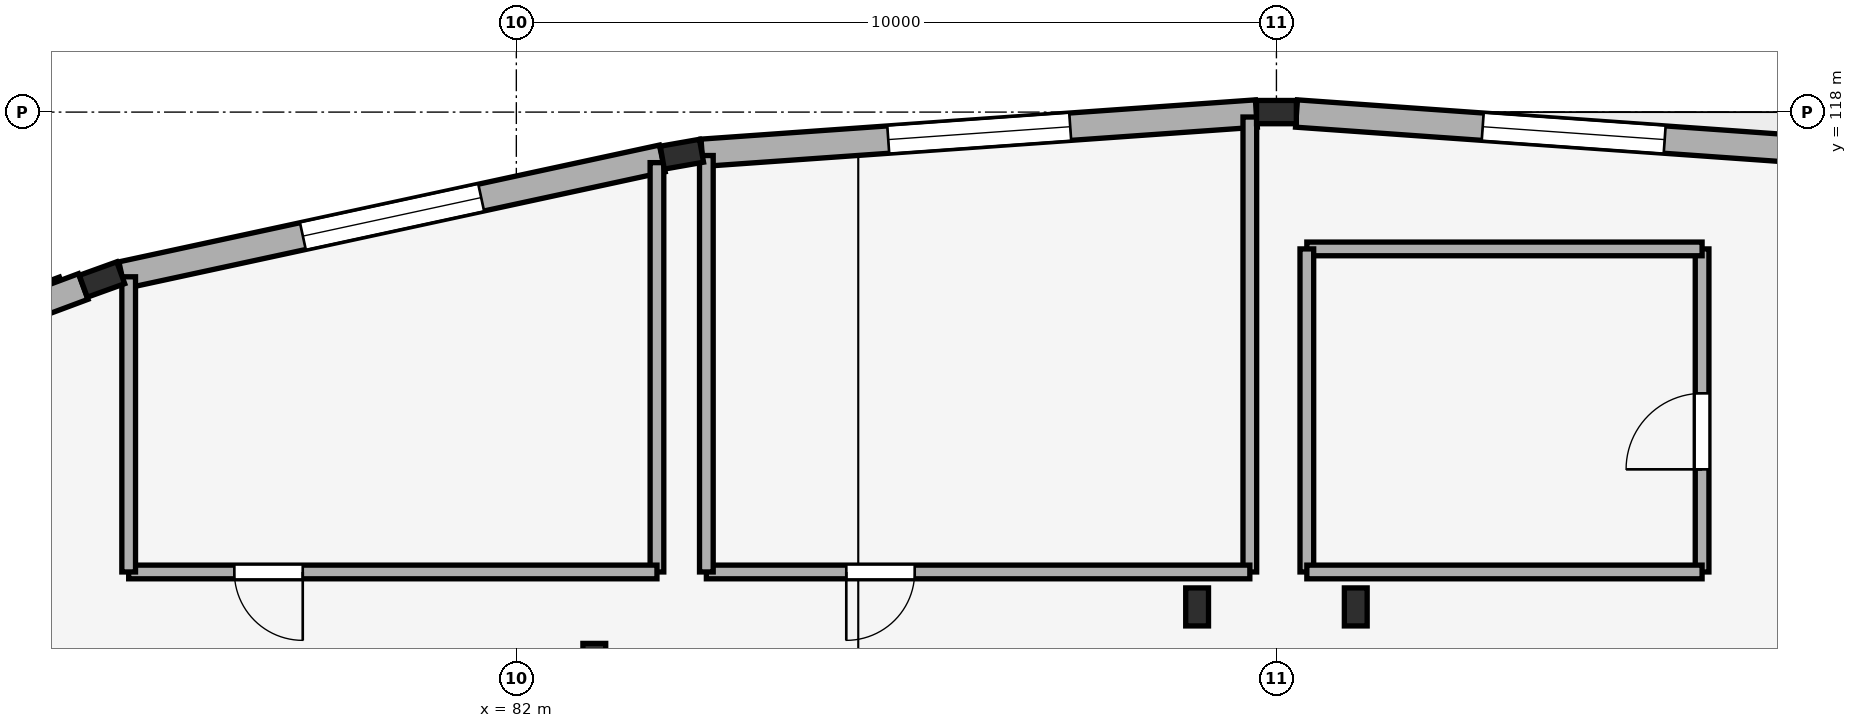
"""IFC4 building model, lengths in metres.
Left out: names, types, materials, properties, quantities, classifications, styles, units other than length and angle.
Written with IfcOpenShell. Run it as: python <this file> out.ifc"""

import sys

from ifc_helpers import new_model, si_unit, direction, frame, frame_2d, origin, origin_2d, place, context, subcontext, project, spatial, rectangle, i_section, extrude, element, fill, save


model = new_model("IFC4")
c1 = context("Model", 3, precision=1e-05, world=origin(), true_north=direction((0.0, 1.0)))
c2 = subcontext(c1, "Body", "Model", "MODEL_VIEW")
j1 = project(units=[si_unit("LENGTHUNIT", "METRE"), si_unit("PLANEANGLEUNIT", "RADIAN")], contexts=[c1])
p1 = place(None, origin())
s1 = spatial("IfcSite", under=j1, at=p1, CompositionType="ELEMENT")
p2 = place(p1, origin())
s2 = spatial("IfcBuilding", under=s1, at=p2, CompositionType="ELEMENT")
p3 = place(p2, frame((0.0, 0.0, 10.2)))
s3 = spatial("IfcBuildingStorey", under=s2, at=p3, CompositionType="ELEMENT", Elevation=10.2)
for number, where, z_axis, x_axis in (
    (1, (92.0, 118.0, 0.0), (0.0, 0.0, 1.0), (0.0, 1.0, 0.0)),
    (2, (84.178, 117.446, 0.0), (0.0, 0.0, 1.0), (-0.173, 0.985, 0.0)),
    (3, (76.549, 115.798, 0.0), (0.0, 0.0, 1.0), (-0.34, 0.941, 0.0)),
):
    element("IfcColumn", number, at=place(p3, frame(where, z_axis=z_axis, x_axis=x_axis)), inside=s3, PredefinedType="COLUMN", context=c2, shape_type="SweptSolid", body=[
        extrude(i_section(OverallWidth=0.306, OverallDepth=0.524, WebThickness=0.021, FlangeThickness=0.04, FilletRadius=0.027, at=origin_2d()), origin(), (0.0, 0.0, 1.0), 4.8),
    ])
for number, where, z_axis, x_axis in (
    (4, (93.044, 111.49, 0.0), (0.0, 0.0, 1.0), (1.0, 0.0, 0.0)),
    (5, (90.956, 111.49, 0.0), (0.0, 0.0, 1.0), (1.0, 0.0, 0.0)),
    (6, (83.026, 110.76, 0.0), (0.0, 0.0, 1.0), (1.0, 0.0, 0.0)),
):
    element("IfcColumn", number, at=place(p3, frame(where, z_axis=z_axis, x_axis=x_axis)), inside=s3, PredefinedType="COLUMN", context=c2, shape_type="SweptSolid", body=[
        extrude(i_section(OverallWidth=0.3, OverallDepth=0.5, WebThickness=0.014, FlangeThickness=0.028, FilletRadius=0.027, at=origin_2d()), origin(), (0.0, 0.0, 1.0), 4.8),
    ])
p4 = place(p3, frame((69.551, 113.189, 0.0), z_axis=(0.0, 0.0, 1.0), x_axis=(0.937008405259, 0.349306811378, 0.0)))
e7 = element("IfcWall", 7, at=p4, inside=s3, PredefinedType="STANDARD", context=c2, shape_type="SweptSolid", body=[
    extrude(rectangle(XDim=7.205, YDim=0.36, at=frame_2d((3.602, 0.0))), origin(), (0.0, 0.0, 1.0), 3.832),
])
p5 = place(p4, frame((1.902, 0.0, 0.9)))
e8 = element("IfcOpeningElement", 8, at=p5, cuts=e7, PredefinedType="OPENING", context=c2, shape_type="SweptSolid", body=[
    extrude(rectangle(XDim=3.4, YDim=2.0, at=frame_2d((1.7, 1.0))), frame((0.0, 0.19, 0.0), z_axis=(0.0, -1.0, 0.0), x_axis=(1.0, 0.0, 0.0)), (0.0, 0.0, 1.0), 0.38),
])
p6 = place(p3, frame((76.81, 115.854, 0.0), z_axis=(0.0, 0.0, 1.0), x_axis=(0.977443945478, 0.211195012838, 0.0)))
e9 = element("IfcWall", 9, at=p6, inside=s3, PredefinedType="STANDARD", context=c2, shape_type="SweptSolid", body=[
    extrude(rectangle(XDim=7.275, YDim=0.36, at=frame_2d((3.637, 0.0))), origin(), (0.0, 0.0, 1.0), 3.832),
])
p7 = place(p6, frame((2.437, 0.0, 1.65)))
e10 = element("IfcOpeningElement", 10, at=p7, cuts=e9, PredefinedType="OPENING", context=c2, shape_type="SweptSolid", body=[
    extrude(rectangle(XDim=2.4, YDim=1.4, at=frame_2d((1.2, 0.7))), frame((0.0, 0.19, 0.0), z_axis=(0.0, -1.0, 0.0), x_axis=(1.0, 0.0, 0.0)), (0.0, 0.0, 1.0), 0.38),
])
p8 = place(p3, frame((84.443, 117.465, 0.0), z_axis=(0.0, 0.0, 1.0), x_axis=(0.99750291648, 0.070625290183, 0.0)))
e11 = element("IfcWall", 11, at=p8, inside=s3, PredefinedType="STANDARD", context=c2, shape_type="SweptSolid", body=[
    extrude(rectangle(XDim=7.311, YDim=0.36, at=frame_2d((3.656, 0.0))), origin(), (0.0, 0.0, 1.0), 3.832),
])
p9 = place(p8, frame((2.456, 0.0, 1.65)))
e12 = element("IfcOpeningElement", 12, at=p9, cuts=e11, PredefinedType="OPENING", context=c2, shape_type="SweptSolid", body=[
    extrude(rectangle(XDim=2.4, YDim=1.4, at=frame_2d((1.2, 0.7))), frame((0.0, 0.19, 0.0), z_axis=(0.0, -1.0, 0.0), x_axis=(1.0, 0.0, 0.0)), (0.0, 0.0, 1.0), 0.38),
])
p10 = place(p3, frame((92.264, 117.981, 0.0), z_axis=(0.0, 0.0, 1.0), x_axis=(0.99750291648, -0.070625290183, 0.0)))
e13 = element("IfcWall", 13, at=p10, inside=s3, PredefinedType="STANDARD", context=c2, shape_type="SweptSolid", body=[
    extrude(rectangle(XDim=7.311, YDim=0.36, at=frame_2d((3.656, 0.0))), origin(), (0.0, 0.0, 1.0), 3.832),
])
p11 = place(p10, frame((2.456, 0.0, 1.65)))
e14 = element("IfcOpeningElement", 14, at=p11, cuts=e13, PredefinedType="OPENING", context=c2, shape_type="SweptSolid", body=[
    extrude(rectangle(XDim=2.4, YDim=1.4, at=frame_2d((1.2, 0.7))), frame((0.0, 0.19, 0.0), z_axis=(0.0, -1.0, 0.0), x_axis=(1.0, 0.0, 0.0)), (0.0, 0.0, 1.0), 0.38),
])
p12 = place(p3, frame((83.85, 117.335, 0.0), z_axis=(0.0, 0.0, 1.0), x_axis=(0.0, -1.0, 0.0)))
e15 = element("IfcWall", 15, at=p12, inside=s3, PredefinedType="PARTITIONING", context=c2, shape_type="SweptSolid", body=[
    extrude(rectangle(XDim=5.385, YDim=0.18, at=frame_2d((2.693, 0.0))), origin(), (0.0, 0.0, 1.0), 4.52),
])
p13 = place(p3, frame((83.85, 111.95, 0.0), z_axis=(0.0, 0.0, 1.0), x_axis=(-1.0, 0.0, 0.0)))
e16 = element("IfcWall", 16, at=p13, inside=s3, PredefinedType="PARTITIONING", context=c2, shape_type="SweptSolid", body=[
    extrude(rectangle(XDim=6.95, YDim=0.18, at=frame_2d((3.475, 0.0))), origin(), (0.0, 0.0, 1.0), 4.52),
])
p14 = place(p13, frame((4.66, 0.0, 0.0)))
e17 = element("IfcOpeningElement", 17, at=p14, cuts=e16, PredefinedType="OPENING", context=c2, shape_type="SweptSolid", body=[
    extrude(rectangle(XDim=0.9, YDim=2.1, at=frame_2d((0.45, 1.05))), frame((0.0, 0.1, 0.0), z_axis=(0.0, -1.0, 0.0), x_axis=(1.0, 0.0, 0.0)), (0.0, 0.0, 1.0), 0.2),
])
p15 = place(p3, frame((76.9, 111.95, 0.0), z_axis=(0.0, 0.0, 1.0), x_axis=(0.0, 1.0, 0.0)))
e18 = element("IfcWall", 18, at=p15, inside=s3, PredefinedType="PARTITIONING", context=c2, shape_type="SweptSolid", body=[
    extrude(rectangle(XDim=3.883, YDim=0.18, at=frame_2d((1.942, 0.0))), origin(), (0.0, 0.0, 1.0), 4.52),
])
p16 = place(p3, frame((91.65, 117.935, 0.0), z_axis=(0.0, 0.0, 1.0), x_axis=(0.0, -1.0, 0.0)))
e19 = element("IfcWall", 19, at=p16, inside=s3, PredefinedType="PARTITIONING", context=c2, shape_type="SweptSolid", body=[
    extrude(rectangle(XDim=5.985, YDim=0.18, at=frame_2d((2.993, 0.0))), origin(), (0.0, 0.0, 1.0), 3.753),
])
p17 = place(p3, frame((91.65, 111.95, 0.0), z_axis=(0.0, 0.0, 1.0), x_axis=(-1.0, 0.0, 0.0)))
e20 = element("IfcWall", 20, at=p17, inside=s3, PredefinedType="PARTITIONING", context=c2, shape_type="SweptSolid", body=[
    extrude(rectangle(XDim=7.15, YDim=0.18, at=frame_2d((3.575, 0.0))), origin(), (0.0, 0.0, 1.0), 4.52),
])
p18 = place(p17, frame((4.409, 0.0, 0.0)))
e21 = element("IfcOpeningElement", 21, at=p18, cuts=e20, PredefinedType="OPENING", context=c2, shape_type="SweptSolid", body=[
    extrude(rectangle(XDim=0.9, YDim=2.1, at=frame_2d((0.45, 1.05))), frame((0.0, 0.1, 0.0), z_axis=(0.0, -1.0, 0.0), x_axis=(1.0, 0.0, 0.0)), (0.0, 0.0, 1.0), 0.2),
])
p19 = place(p3, frame((84.5, 111.95, 0.0), z_axis=(0.0, 0.0, 1.0), x_axis=(0.0, 1.0, 0.0)))
e22 = element("IfcWall", 22, at=p19, inside=s3, PredefinedType="PARTITIONING", context=c2, shape_type="SweptSolid", body=[
    extrude(rectangle(XDim=5.479, YDim=0.18, at=frame_2d((2.739, 0.0))), origin(), (0.0, 0.0, 1.0), 4.52),
])
p20 = place(p3, frame((97.6, 111.95, 0.0), z_axis=(0.0, 0.0, 1.0), x_axis=(0.0, 1.0, 0.0)))
e23 = element("IfcWall", 23, at=p20, inside=s3, PredefinedType="PARTITIONING", context=c2, shape_type="SweptSolid", body=[
    extrude(rectangle(XDim=4.25, YDim=0.18, at=frame_2d((2.125, 0.0))), origin(), (0.0, 0.0, 1.0), 4.52),
])
p21 = place(p20, frame((1.35, 0.0, 0.0)))
e24 = element("IfcOpeningElement", 24, at=p21, cuts=e23, PredefinedType="OPENING", context=c2, shape_type="SweptSolid", body=[
    extrude(rectangle(XDim=1.0, YDim=2.15, at=frame_2d((0.5, 1.075))), frame((0.0, 0.1, 0.0), z_axis=(0.0, -1.0, 0.0), x_axis=(1.0, 0.0, 0.0)), (0.0, 0.0, 1.0), 0.2),
])
p22 = place(p3, frame((97.6, 116.2, 0.0), z_axis=(0.0, 0.0, 1.0), x_axis=(-1.0, 0.0, 0.0)))
e25 = element("IfcWall", 25, at=p22, inside=s3, PredefinedType="PARTITIONING", context=c2, shape_type="SweptSolid", body=[
    extrude(rectangle(XDim=5.2, YDim=0.18, at=frame_2d((2.6, 0.0))), origin(), (0.0, 0.0, 1.0), 4.52),
])
p23 = place(p3, frame((92.4, 116.2, 0.0), z_axis=(0.0, 0.0, 1.0), x_axis=(0.0, -1.0, 0.0)))
e26 = element("IfcWall", 26, at=p23, inside=s3, PredefinedType="PARTITIONING", context=c2, shape_type="SweptSolid", body=[
    extrude(rectangle(XDim=4.25, YDim=0.18, at=frame_2d((2.125, 0.0))), origin(), (0.0, 0.0, 1.0), 3.753),
])
p24 = place(p3, frame((92.4, 111.95, 0.0), z_axis=(0.0, 0.0, 1.0), x_axis=(1.0, 0.0, 0.0)))
e27 = element("IfcWall", 27, at=p24, inside=s3, PredefinedType="PARTITIONING", context=c2, shape_type="SweptSolid", body=[
    extrude(rectangle(XDim=5.2, YDim=0.18, at=frame_2d((2.6, 0.0))), origin(), (0.0, 0.0, 1.0), 4.52),
])
p25 = place(p7, origin())
e28 = element("IfcWindow", 28, at=p25, inside=s3, PartitioningType="SINGLE_PANEL", PredefinedType="WINDOW", context=c2, shape_type="SweptSolid", body=[
    extrude(rectangle(XDim=2.4, YDim=1.4, at=frame_2d((1.2, 0.7))), frame((0.0, 0.03, 0.0), z_axis=(0.0, -1.0, 0.0), x_axis=(1.0, 0.0, 0.0)), (0.0, 0.0, 1.0), 0.06),
])
fill(e10, e28)
p26 = place(p9, origin())
e29 = element("IfcWindow", 29, at=p26, inside=s3, PartitioningType="SINGLE_PANEL", PredefinedType="WINDOW", context=c2, shape_type="SweptSolid", body=[
    extrude(rectangle(XDim=2.4, YDim=1.4, at=frame_2d((1.2, 0.7))), frame((0.0, 0.03, 0.0), z_axis=(0.0, -1.0, 0.0), x_axis=(1.0, 0.0, 0.0)), (0.0, 0.0, 1.0), 0.06),
])
fill(e12, e29)
p27 = place(p11, origin())
e30 = element("IfcWindow", 30, at=p27, inside=s3, PartitioningType="SINGLE_PANEL", PredefinedType="WINDOW", context=c2, shape_type="SweptSolid", body=[
    extrude(rectangle(XDim=2.4, YDim=1.4, at=frame_2d((1.2, 0.7))), frame((0.0, 0.03, 0.0), z_axis=(0.0, -1.0, 0.0), x_axis=(1.0, 0.0, 0.0)), (0.0, 0.0, 1.0), 0.06),
])
fill(e14, e30)
p28 = place(p14, origin())
e31 = element("IfcDoor", 31, at=p28, inside=s3, OperationType="SINGLE_SWING_LEFT", PredefinedType="DOOR", context=c2, shape_type="SweptSolid", body=[
    extrude(rectangle(XDim=0.9, YDim=2.1, at=frame_2d((0.45, 1.05))), frame((0.0, 0.025, 0.0), z_axis=(0.0, -1.0, 0.0), x_axis=(1.0, 0.0, 0.0)), (0.0, 0.0, 1.0), 0.05),
])
fill(e17, e31)
p29 = place(p18, origin())
e32 = element("IfcDoor", 32, at=p29, inside=s3, OperationType="SINGLE_SWING_RIGHT", PredefinedType="DOOR", context=c2, shape_type="SweptSolid", body=[
    extrude(rectangle(XDim=0.9, YDim=2.1, at=frame_2d((0.45, 1.05))), frame((0.0, 0.025, 0.0), z_axis=(0.0, -1.0, 0.0), x_axis=(1.0, 0.0, 0.0)), (0.0, 0.0, 1.0), 0.05),
])
fill(e21, e32)
p30 = place(p21, origin())
e33 = element("IfcDoor", 33, at=p30, inside=s3, OperationType="SINGLE_SWING_LEFT", PredefinedType="DOOR", context=c2, shape_type="SweptSolid", body=[
    extrude(rectangle(XDim=1.0, YDim=2.15, at=frame_2d((0.5, 1.075))), frame((0.0, 0.025, 0.0), z_axis=(0.0, -1.0, 0.0), x_axis=(1.0, 0.0, 0.0)), (0.0, 0.0, 1.0), 0.05),
])
fill(e24, e33)
save(model, sys.argv[1])
